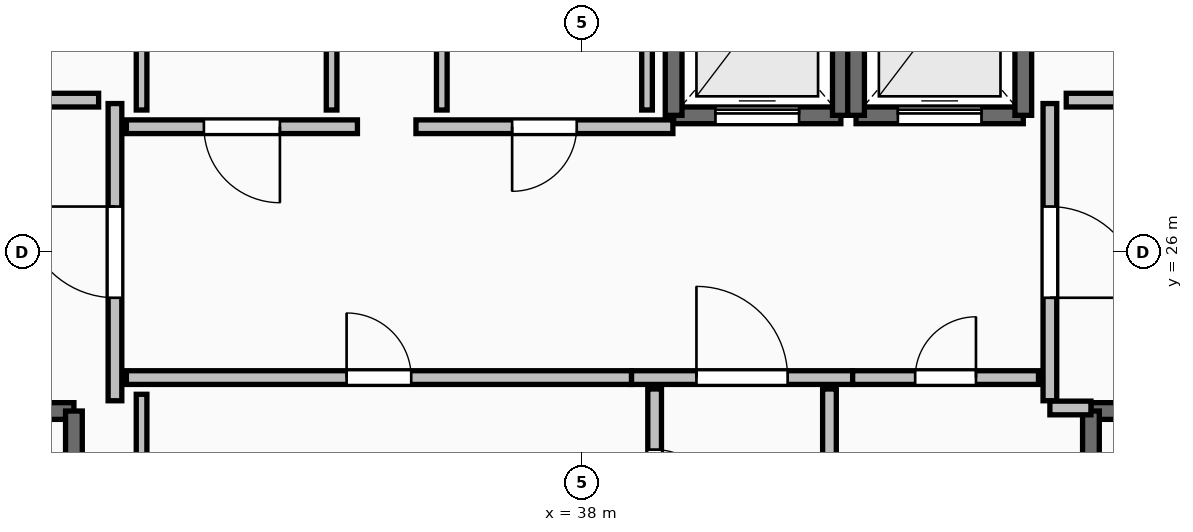
"""IFC4 building model, lengths in metres.
Left out: names, types, materials, properties, quantities, classifications, styles, units other than length and angle.
Written with IfcOpenShell. Run it as: python <this file> out.ifc"""

import sys

from ifc_helpers import new_model, si_unit, direction, frame, frame_2d, origin, place, context, subcontext, project, spatial, rectangle, extrude, element, fill, save


model = new_model("IFC4")
c1 = context("Model", 3, precision=1e-05, world=origin(), true_north=direction((0.0, 1.0)))
c2 = subcontext(c1, "Body", "Model", "MODEL_VIEW")
j1 = project(units=[si_unit("LENGTHUNIT", "METRE"), si_unit("PLANEANGLEUNIT", "RADIAN")], contexts=[c1])
p1 = place(None, origin())
s1 = spatial("IfcSite", under=j1, at=p1, CompositionType="ELEMENT")
p2 = place(p1, origin())
s2 = spatial("IfcBuilding", under=s1, at=p2, CompositionType="ELEMENT")
p3 = place(p2, frame((0.0, 0.0, 229.75)))
s3 = spatial("IfcBuildingStorey", under=s2, at=p3, CompositionType="ELEMENT", Elevation=229.75)
p4 = place(p3, frame((27.94, 23.91, 0.0), z_axis=(0.0, 0.0, 1.0), x_axis=(1.0, 0.0, 0.0)))
e1 = element("IfcWall", 1, at=p4, inside=s3, PredefinedType="SOLIDWALL", context=c2, shape_type="SweptSolid", body=[
    extrude(rectangle(XDim=3.37, YDim=0.22, at=frame_2d((1.685, 0.0))), origin(), (0.0, 0.0, 1.0), 4.24),
])
p5 = place(p4, frame((1.135, 0.0, 0.0)))
e2 = element("IfcOpeningElement", 2, at=p5, cuts=e1, PredefinedType="OPENING", context=c2, shape_type="SweptSolid", body=[
    extrude(rectangle(XDim=1.1, YDim=2.15, at=frame_2d((0.55, 1.075))), frame((0.0, 0.125, 0.0), z_axis=(0.0, -1.0, 0.0), x_axis=(1.0, 0.0, 0.0)), (0.0, 0.0, 1.0), 0.25),
])
p6 = place(p3, frame((31.31, 23.91, 0.0), z_axis=(0.0, 0.0, 1.0), x_axis=(0.0, -1.0, 0.0)))
e3 = element("IfcWall", 3, at=p6, inside=s3, PredefinedType="SOLIDWALL", context=c2, shape_type="SweptSolid", body=[
    extrude(rectangle(XDim=7.42, YDim=0.22, at=frame_2d((3.71, 0.0))), origin(), (0.0, 0.0, 1.0), 4.24),
])
p7 = place(p3, frame((44.69, 23.91, 0.0), z_axis=(0.0, 0.0, 1.0), x_axis=(1.0, 0.0, 0.0)))
e4 = element("IfcWall", 4, at=p7, inside=s3, PredefinedType="SOLIDWALL", context=c2, shape_type="SweptSolid", body=[
    extrude(rectangle(XDim=3.37, YDim=0.22, at=frame_2d((1.685, 0.0))), origin(), (0.0, 0.0, 1.0), 4.24),
])
p8 = place(p7, frame((1.135, 0.0, 0.0)))
e5 = element("IfcOpeningElement", 5, at=p8, cuts=e4, PredefinedType="OPENING", context=c2, shape_type="SweptSolid", body=[
    extrude(rectangle(XDim=1.1, YDim=2.15, at=frame_2d((0.55, 1.075))), frame((0.0, 0.125, 0.0), z_axis=(0.0, -1.0, 0.0), x_axis=(1.0, 0.0, 0.0)), (0.0, 0.0, 1.0), 0.25),
])
p9 = place(p3, frame((44.69, 16.49, 0.0), z_axis=(0.0, 0.0, 1.0), x_axis=(0.0, 1.0, 0.0)))
e6 = element("IfcWall", 6, at=p9, inside=s3, PredefinedType="SOLIDWALL", context=c2, shape_type="SweptSolid", body=[
    extrude(rectangle(XDim=7.42, YDim=0.22, at=frame_2d((3.71, 0.0))), origin(), (0.0, 0.0, 1.0), 4.24),
])
p10 = place(p3, frame((39.2, 27.8, 0.0), z_axis=(0.0, 0.0, 1.0), x_axis=(1.0, 0.0, 0.0)))
e7 = element("IfcWall", 7, at=p10, inside=s3, PredefinedType="SOLIDWALL", context=c2, shape_type="SweptSolid", body=[
    extrude(rectangle(XDim=2.2, YDim=0.22, at=frame_2d((1.1, 0.0))), origin(), (0.0, 0.0, 1.0), 4.24),
])
p11 = place(p10, frame((0.55, 0.0, 0.0)))
e8 = element("IfcOpeningElement", 8, at=p11, cuts=e7, PredefinedType="OPENING", context=c2, shape_type="SweptSolid", body=[
    extrude(rectangle(XDim=1.1, YDim=2.2, at=frame_2d((0.55, 1.1))), frame((0.0, 0.125, 0.0), z_axis=(0.0, -1.0, 0.0), x_axis=(1.0, 0.0, 0.0)), (0.0, 0.0, 1.0), 0.25),
])
for number, where, z_axis, x_axis in (
    (9, (41.4, 27.8, 0.0), (0.0, 0.0, 1.0), (0.0, 1.0, 0.0)),
    (10, (39.2, 30.4, 0.0), (0.0, 0.0, 1.0), (0.0, -1.0, 0.0)),
):
    element("IfcWall", number, at=place(p3, frame(where, z_axis=z_axis, x_axis=x_axis)), inside=s3, PredefinedType="SOLIDWALL", context=c2, shape_type="SweptSolid", body=[
        extrude(rectangle(XDim=2.6, YDim=0.22, at=frame_2d((1.3, 0.0))), origin(), (0.0, 0.0, 1.0), 4.24),
    ])
p12 = place(p3, frame((41.6, 27.8, 0.0), z_axis=(0.0, 0.0, 1.0), x_axis=(1.0, 0.0, 0.0)))
e11 = element("IfcWall", 11, at=p12, inside=s3, PredefinedType="SOLIDWALL", context=c2, shape_type="SweptSolid", body=[
    extrude(rectangle(XDim=2.2, YDim=0.22, at=frame_2d((1.1, 0.0))), origin(), (0.0, 0.0, 1.0), 4.24),
])
p13 = place(p12, frame((0.55, 0.0, 0.0)))
e12 = element("IfcOpeningElement", 12, at=p13, cuts=e11, PredefinedType="OPENING", context=c2, shape_type="SweptSolid", body=[
    extrude(rectangle(XDim=1.1, YDim=2.2, at=frame_2d((0.55, 1.1))), frame((0.0, 0.125, 0.0), z_axis=(0.0, -1.0, 0.0), x_axis=(1.0, 0.0, 0.0)), (0.0, 0.0, 1.0), 0.25),
])
for number, where, z_axis, x_axis in (
    (13, (43.8, 27.8, 0.0), (0.0, 0.0, 1.0), (0.0, 1.0, 0.0)),
    (14, (41.6, 30.4, 0.0), (0.0, 0.0, 1.0), (0.0, -1.0, 0.0)),
):
    element("IfcWall", number, at=place(p3, frame(where, z_axis=z_axis, x_axis=x_axis)), inside=s3, PredefinedType="SOLIDWALL", context=c2, shape_type="SweptSolid", body=[
        extrude(rectangle(XDim=2.6, YDim=0.22, at=frame_2d((1.3, 0.0))), origin(), (0.0, 0.0, 1.0), 4.24),
    ])
p14 = place(p3, frame((31.85, 24.045, 0.0), z_axis=(0.0, 0.0, 1.0), x_axis=(0.0, 1.0, 0.0)))
e15 = element("IfcWall", 15, at=p14, inside=s3, PredefinedType="PARTITIONING", context=c2, shape_type="SweptSolid", body=[
    extrude(rectangle(XDim=3.91, YDim=0.18, at=frame_2d((1.955, 0.0))), origin(), (0.0, 0.0, 1.0), 4.24),
])
p15 = place(p14, frame((1.355, 0.0, 0.0)))
e16 = element("IfcOpeningElement", 16, at=p15, cuts=e15, PredefinedType="OPENING", context=c2, shape_type="SweptSolid", body=[
    extrude(rectangle(XDim=1.2, YDim=2.15, at=frame_2d((0.6, 1.075))), frame((0.0, 0.105, 0.0), z_axis=(0.0, -1.0, 0.0), x_axis=(1.0, 0.0, 0.0)), (0.0, 0.0, 1.0), 0.21),
])
p16 = place(p3, frame((44.15, 27.955, 0.0), z_axis=(0.0, 0.0, 1.0), x_axis=(0.0, -1.0, 0.0)))
e17 = element("IfcWall", 17, at=p16, inside=s3, PredefinedType="PARTITIONING", context=c2, shape_type="SweptSolid", body=[
    extrude(rectangle(XDim=3.91, YDim=0.18, at=frame_2d((1.955, 0.0))), origin(), (0.0, 0.0, 1.0), 4.24),
])
p17 = place(p16, frame((1.355, 0.0, 0.0)))
e18 = element("IfcOpeningElement", 18, at=p17, cuts=e17, PredefinedType="OPENING", context=c2, shape_type="SweptSolid", body=[
    extrude(rectangle(XDim=1.2, YDim=2.15, at=frame_2d((0.6, 1.075))), frame((0.0, 0.105, 0.0), z_axis=(0.0, -1.0, 0.0), x_axis=(1.0, 0.0, 0.0)), (0.0, 0.0, 1.0), 0.21),
])
p18 = place(p3, frame((44.15, 23.95, 0.0), z_axis=(0.0, 0.0, 1.0), x_axis=(1.0, 0.0, 0.0)))
e19 = element("IfcWall", 19, at=p18, inside=s3, PredefinedType="PARTITIONING", context=c2, shape_type="SweptSolid", body=[
    extrude(rectangle(XDim=0.54, YDim=0.18, at=frame_2d((0.27, 0.0))), origin(), (0.0, 0.0, 1.0), 4.24),
])
p19 = place(p3, frame((38.645, 24.35, 0.0), z_axis=(0.0, 0.0, 1.0), x_axis=(1.0, 0.0, 0.0)))
e20 = element("IfcWall", 20, at=p19, inside=s3, PredefinedType="PARTITIONING", context=c2, shape_type="SweptSolid", body=[
    extrude(rectangle(XDim=2.91, YDim=0.18, at=frame_2d((1.455, 0.0))), origin(), (0.0, 0.0, 1.0), 4.24),
])
p20 = place(p19, frame((0.855, 0.0, 0.0)))
e21 = element("IfcOpeningElement", 21, at=p20, cuts=e20, PredefinedType="OPENING", context=c2, shape_type="SweptSolid", body=[
    extrude(rectangle(XDim=1.2, YDim=2.15, at=frame_2d((0.6, 1.075))), frame((0.0, 0.105, 0.0), z_axis=(0.0, -1.0, 0.0), x_axis=(1.0, 0.0, 0.0)), (0.0, 0.0, 1.0), 0.21),
])
p21 = place(p3, frame((41.555, 24.35, 0.0), z_axis=(0.0, 0.0, 1.0), x_axis=(1.0, 0.0, 0.0)))
e22 = element("IfcWall", 22, at=p21, inside=s3, PredefinedType="PARTITIONING", context=c2, shape_type="SweptSolid", body=[
    extrude(rectangle(XDim=2.445, YDim=0.18, at=frame_2d((1.223, 0.0))), origin(), (0.0, 0.0, 1.0), 4.24),
])
p22 = place(p21, frame((0.823, 0.0, 0.0)))
e23 = element("IfcOpeningElement", 23, at=p22, cuts=e22, PredefinedType="OPENING", context=c2, shape_type="SweptSolid", body=[
    extrude(rectangle(XDim=0.8, YDim=2.05, at=frame_2d((0.4, 1.025))), frame((0.0, 0.105, 0.0), z_axis=(0.0, -1.0, 0.0), x_axis=(1.0, 0.0, 0.0)), (0.0, 0.0, 1.0), 0.21),
])
p23 = place(p3, frame((35.04, 27.65, 0.0), z_axis=(0.0, 0.0, 1.0), x_axis=(-1.0, 0.0, 0.0)))
e24 = element("IfcWall", 24, at=p23, inside=s3, PredefinedType="PARTITIONING", context=c2, shape_type="SweptSolid", body=[
    extrude(rectangle(XDim=3.04, YDim=0.18, at=frame_2d((1.52, 0.0))), origin(), (0.0, 0.0, 1.0), 4.24),
])
p24 = place(p23, frame((1.02, 0.0, 0.0)))
e25 = element("IfcOpeningElement", 25, at=p24, cuts=e24, PredefinedType="OPENING", context=c2, shape_type="SweptSolid", body=[
    extrude(rectangle(XDim=1.0, YDim=2.15, at=frame_2d((0.5, 1.075))), frame((0.0, 0.105, 0.0), z_axis=(0.0, -1.0, 0.0), x_axis=(1.0, 0.0, 0.0)), (0.0, 0.0, 1.0), 0.21),
])
p25 = place(p3, frame((39.19, 27.65, 0.0), z_axis=(0.0, 0.0, 1.0), x_axis=(-1.0, 0.0, 0.0)))
e26 = element("IfcWall", 26, at=p25, inside=s3, PredefinedType="PARTITIONING", context=c2, shape_type="SweptSolid", body=[
    extrude(rectangle(XDim=3.38, YDim=0.18, at=frame_2d((1.69, 0.0))), origin(), (0.0, 0.0, 1.0), 4.24),
])
p26 = place(p25, frame((1.265, 0.0, 0.0)))
e27 = element("IfcOpeningElement", 27, at=p26, cuts=e26, PredefinedType="OPENING", context=c2, shape_type="SweptSolid", body=[
    extrude(rectangle(XDim=0.85, YDim=2.1, at=frame_2d((0.425, 1.05))), frame((0.0, 0.105, 0.0), z_axis=(0.0, -1.0, 0.0), x_axis=(1.0, 0.0, 0.0)), (0.0, 0.0, 1.0), 0.21),
])
p27 = place(p3, frame((32.0, 24.35, 0.0), z_axis=(0.0, 0.0, 1.0), x_axis=(1.0, 0.0, 0.0)))
e28 = element("IfcWall", 28, at=p27, inside=s3, PredefinedType="PARTITIONING", context=c2, shape_type="SweptSolid", body=[
    extrude(rectangle(XDim=6.645, YDim=0.18, at=frame_2d((3.323, 0.0))), origin(), (0.0, 0.0, 1.0), 4.24),
])
p28 = place(p27, frame((2.897, 0.0, 0.0)))
e29 = element("IfcOpeningElement", 29, at=p28, cuts=e28, PredefinedType="OPENING", context=c2, shape_type="SweptSolid", body=[
    extrude(rectangle(XDim=0.85, YDim=2.1, at=frame_2d((0.425, 1.05))), frame((0.0, 0.105, 0.0), z_axis=(0.0, -1.0, 0.0), x_axis=(1.0, 0.0, 0.0)), (0.0, 0.0, 1.0), 0.21),
])
p29 = place(p3, frame((41.25, 16.32, 0.0), z_axis=(0.0, 0.0, 1.0), x_axis=(0.0, 1.0, 0.0)))
e30 = element("IfcWall", 30, at=p29, inside=s3, PredefinedType="PARTITIONING", context=c2, shape_type="SweptSolid", body=[
    extrude(rectangle(XDim=7.88, YDim=0.18, at=frame_2d((3.94, 0.0))), origin(), (0.0, 0.0, 1.0), 3.432),
])
p30 = place(p29, frame((3.54, 0.0, 0.0)))
e31 = element("IfcOpeningElement", 31, at=p30, cuts=e30, PredefinedType="OPENING", context=c2, shape_type="SweptSolid", body=[
    extrude(rectangle(XDim=0.8, YDim=2.05, at=frame_2d((0.4, 1.025))), frame((0.0, 0.105, 0.0), z_axis=(0.0, -1.0, 0.0), x_axis=(1.0, 0.0, 0.0)), (0.0, 0.0, 1.0), 0.21),
])
p31 = place(p3, frame((38.95, 24.2, 0.0), z_axis=(0.0, 0.0, 1.0), x_axis=(0.0, -1.0, 0.0)))
e32 = element("IfcWall", 32, at=p31, inside=s3, PredefinedType="PARTITIONING", context=c2, shape_type="SweptSolid", body=[
    extrude(rectangle(XDim=2.445, YDim=0.18, at=frame_2d((1.223, 0.0))), origin(), (0.0, 0.0, 1.0), 3.432),
])
p32 = place(p31, frame((0.798, 0.0, 0.0)))
e33 = element("IfcOpeningElement", 33, at=p32, cuts=e32, PredefinedType="OPENING", context=c2, shape_type="SweptSolid", body=[
    extrude(rectangle(XDim=0.85, YDim=2.1, at=frame_2d((0.425, 1.05))), frame((0.0, 0.105, 0.0), z_axis=(0.0, -1.0, 0.0), x_axis=(1.0, 0.0, 0.0)), (0.0, 0.0, 1.0), 0.21),
])
for number, where, z_axis, x_axis in (
    (34, (31.635, 28.0, 0.0), (0.0, 0.0, 1.0), (-1.0, 0.0, 0.0)),
    (35, (45.28, 28.0, 0.0), (0.0, 0.0, 1.0), (-1.0, 0.0, 0.0)),
):
    element("IfcWall", number, at=place(p3, frame(where, z_axis=z_axis, x_axis=x_axis)), inside=s3, PredefinedType="PARTITIONING", context=c2, shape_type="SweptSolid", body=[
        extrude(rectangle(XDim=0.915, YDim=0.18, at=frame_2d((0.458, 0.0))), origin(), (0.0, 0.0, 1.0), 4.24),
    ])
for number, where, z_axis, x_axis in (
    (36, (32.2, 30.26, 0.0), (0.0, 0.0, 1.0), (0.0, -1.0, 0.0)),
    (37, (34.7, 27.87, 0.0), (0.0, 0.0, 1.0), (0.0, 1.0, 0.0)),
):
    element("IfcWall", number, at=place(p3, frame(where, z_axis=z_axis, x_axis=x_axis)), inside=s3, PredefinedType="PARTITIONING", context=c2, shape_type="SweptSolid", body=[
        extrude(rectangle(XDim=2.39, YDim=0.14, at=frame_2d((1.195, 0.0))), origin(), (0.0, 0.0, 1.0), 4.24),
    ])
p33 = place(p3, frame((36.15, 30.03, 0.0), z_axis=(0.0, 0.0, 1.0), x_axis=(0.0, -1.0, 0.0)))
e38 = element("IfcWall", 38, at=p33, inside=s3, PredefinedType="PARTITIONING", context=c2, shape_type="SweptSolid", body=[
    extrude(rectangle(XDim=2.16, YDim=0.14, at=frame_2d((1.08, 0.0))), origin(), (0.0, 0.0, 1.0), 4.24),
])
p34 = place(p3, frame((38.85, 27.87, 0.0), z_axis=(0.0, 0.0, 1.0), x_axis=(0.0, 1.0, 0.0)))
e39 = element("IfcWall", 39, at=p34, inside=s3, PredefinedType="PARTITIONING", context=c2, shape_type="SweptSolid", body=[
    extrude(rectangle(XDim=2.39, YDim=0.14, at=frame_2d((1.195, 0.0))), origin(), (0.0, 0.0, 1.0), 4.24),
])
p35 = place(p3, frame((32.2, 24.13, 0.0), z_axis=(0.0, 0.0, 1.0), x_axis=(0.0, -1.0, 0.0)))
e40 = element("IfcWall", 40, at=p35, inside=s3, PredefinedType="PARTITIONING", context=c2, shape_type="SweptSolid", body=[
    extrude(rectangle(XDim=2.46, YDim=0.14, at=frame_2d((1.23, 0.0))), origin(), (0.0, 0.0, 1.0), 3.432),
])
p36 = place(p11, origin())
e41 = element("IfcDoor", 41, at=p36, inside=s3, OperationType="SLIDING_TO_LEFT", PredefinedType="DOOR", context=c2, shape_type="SweptSolid", body=[
    extrude(rectangle(XDim=1.1, YDim=2.2, at=frame_2d((0.55, 1.1))), frame((0.0, 0.025, 0.0), z_axis=(0.0, -1.0, 0.0), x_axis=(1.0, 0.0, 0.0)), (0.0, 0.0, 1.0), 0.05),
])
fill(e8, e41)
p37 = place(p13, origin())
e42 = element("IfcDoor", 42, at=p37, inside=s3, OperationType="SLIDING_TO_LEFT", PredefinedType="DOOR", context=c2, shape_type="SweptSolid", body=[
    extrude(rectangle(XDim=1.1, YDim=2.2, at=frame_2d((0.55, 1.1))), frame((0.0, 0.025, 0.0), z_axis=(0.0, -1.0, 0.0), x_axis=(1.0, 0.0, 0.0)), (0.0, 0.0, 1.0), 0.05),
])
fill(e12, e42)
p38 = place(p15, origin())
e43 = element("IfcDoor", 43, at=p38, inside=s3, OperationType="SINGLE_SWING_RIGHT", PredefinedType="DOOR", context=c2, shape_type="SweptSolid", body=[
    extrude(rectangle(XDim=1.2, YDim=2.15, at=frame_2d((0.6, 1.075))), frame((0.0, 0.025, 0.0), z_axis=(0.0, -1.0, 0.0), x_axis=(1.0, 0.0, 0.0)), (0.0, 0.0, 1.0), 0.05),
])
fill(e16, e43)
p39 = place(p17, origin())
e44 = element("IfcDoor", 44, at=p39, inside=s3, OperationType="SINGLE_SWING_RIGHT", PredefinedType="DOOR", context=c2, shape_type="SweptSolid", body=[
    extrude(rectangle(XDim=1.2, YDim=2.15, at=frame_2d((0.6, 1.075))), frame((0.0, 0.025, 0.0), z_axis=(0.0, -1.0, 0.0), x_axis=(1.0, 0.0, 0.0)), (0.0, 0.0, 1.0), 0.05),
])
fill(e18, e44)
p40 = place(p20, origin())
e45 = element("IfcDoor", 45, at=p40, inside=s3, OperationType="SINGLE_SWING_LEFT", PredefinedType="DOOR", context=c2, shape_type="SweptSolid", body=[
    extrude(rectangle(XDim=1.2, YDim=2.15, at=frame_2d((0.6, 1.075))), frame((0.0, 0.025, 0.0), z_axis=(0.0, -1.0, 0.0), x_axis=(1.0, 0.0, 0.0)), (0.0, 0.0, 1.0), 0.05),
])
fill(e21, e45)
p41 = place(p22, origin())
e46 = element("IfcDoor", 46, at=p41, inside=s3, OperationType="SINGLE_SWING_RIGHT", PredefinedType="DOOR", context=c2, shape_type="SweptSolid", body=[
    extrude(rectangle(XDim=0.8, YDim=2.05, at=frame_2d((0.4, 1.025))), frame((0.0, 0.025, 0.0), z_axis=(0.0, -1.0, 0.0), x_axis=(1.0, 0.0, 0.0)), (0.0, 0.0, 1.0), 0.05),
])
fill(e23, e46)
p42 = place(p24, origin())
e47 = element("IfcDoor", 47, at=p42, inside=s3, OperationType="SINGLE_SWING_LEFT", PredefinedType="DOOR", context=c2, shape_type="SweptSolid", body=[
    extrude(rectangle(XDim=1.0, YDim=2.15, at=frame_2d((0.5, 1.075))), frame((0.0, 0.025, 0.0), z_axis=(0.0, -1.0, 0.0), x_axis=(1.0, 0.0, 0.0)), (0.0, 0.0, 1.0), 0.05),
])
fill(e25, e47)
p43 = place(p26, origin())
e48 = element("IfcDoor", 48, at=p43, inside=s3, OperationType="SINGLE_SWING_RIGHT", PredefinedType="DOOR", context=c2, shape_type="SweptSolid", body=[
    extrude(rectangle(XDim=0.85, YDim=2.1, at=frame_2d((0.425, 1.05))), frame((0.0, 0.025, 0.0), z_axis=(0.0, -1.0, 0.0), x_axis=(1.0, 0.0, 0.0)), (0.0, 0.0, 1.0), 0.05),
])
fill(e27, e48)
p44 = place(p28, origin())
e49 = element("IfcDoor", 49, at=p44, inside=s3, OperationType="SINGLE_SWING_LEFT", PredefinedType="DOOR", context=c2, shape_type="SweptSolid", body=[
    extrude(rectangle(XDim=0.85, YDim=2.1, at=frame_2d((0.425, 1.05))), frame((0.0, 0.025, 0.0), z_axis=(0.0, -1.0, 0.0), x_axis=(1.0, 0.0, 0.0)), (0.0, 0.0, 1.0), 0.05),
])
fill(e29, e49)
p45 = place(p32, origin())
e50 = element("IfcDoor", 50, at=p45, inside=s3, OperationType="SINGLE_SWING_RIGHT", PredefinedType="DOOR", context=c2, shape_type="SweptSolid", body=[
    extrude(rectangle(XDim=0.85, YDim=2.1, at=frame_2d((0.425, 1.05))), frame((0.0, 0.025, 0.0), z_axis=(0.0, -1.0, 0.0), x_axis=(1.0, 0.0, 0.0)), (0.0, 0.0, 1.0), 0.05),
])
fill(e33, e50)
save(model, sys.argv[1])
